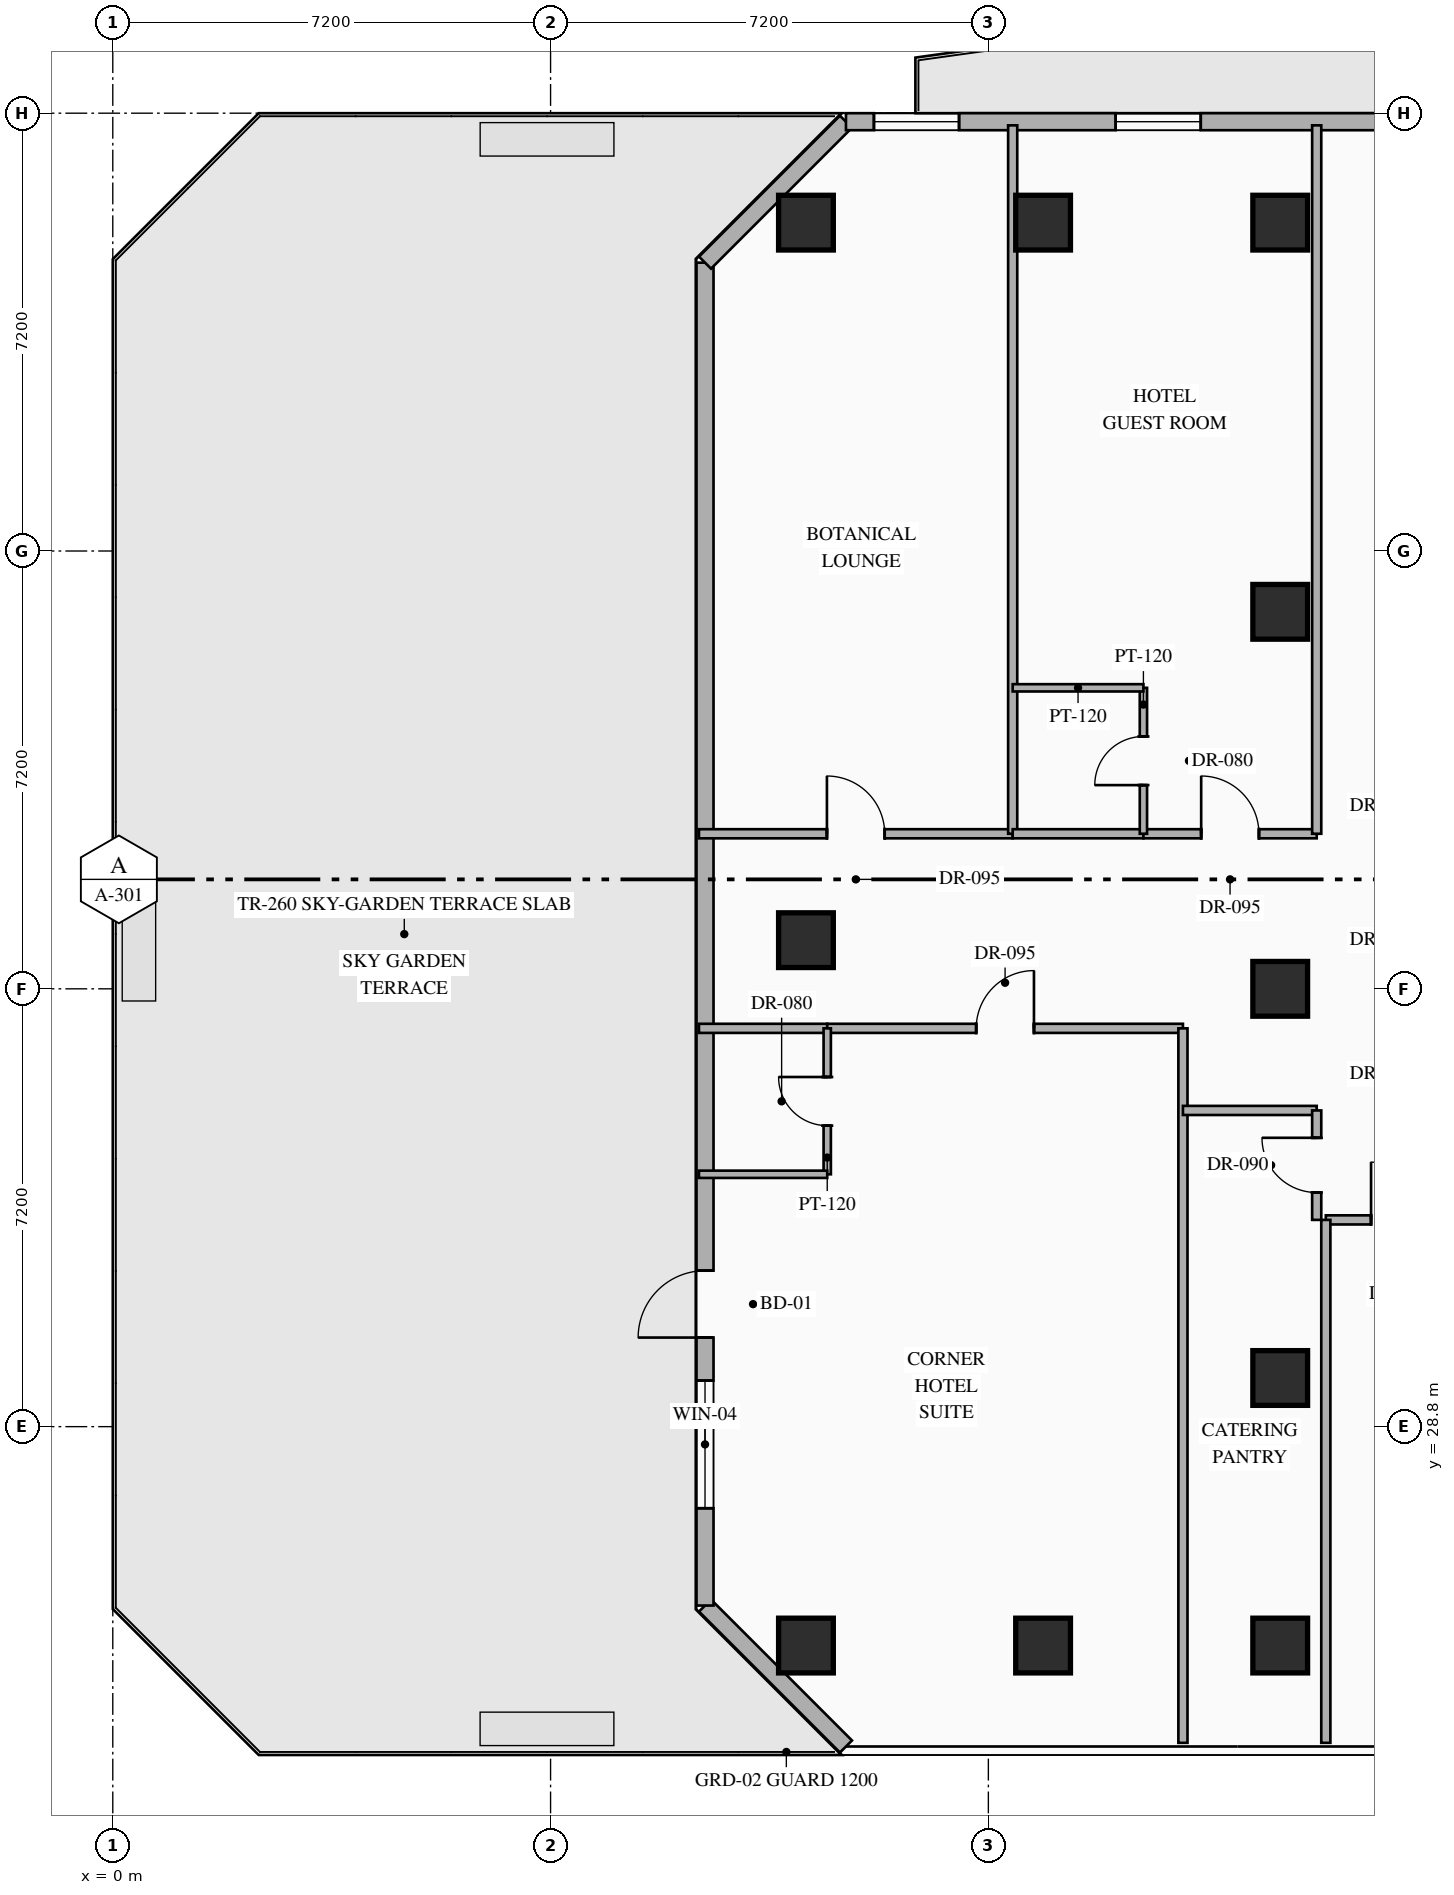
"""IFC4 building model, lengths in metres.
Left out: names, types, materials, properties, quantities, classifications, styles, units other than length and angle.
Written with IfcOpenShell. Run it as: python <this file> out.ifc"""

import sys

from ifc_helpers import new_model, si_unit, direction, frame, frame_2d, origin, origin_2d, place, context, subcontext, project, spatial, rectangle, hollow_rectangle, extrude, element, fill, save


model = new_model("IFC4")
c1 = context("Model", 3, precision=1e-05, world=origin(), true_north=direction((0.0, 1.0)))
c2 = subcontext(c1, "Body", "Model", "MODEL_VIEW")
j1 = project(units=[si_unit("LENGTHUNIT", "METRE"), si_unit("PLANEANGLEUNIT", "RADIAN")], contexts=[c1])
p1 = place(None, origin())
s1 = spatial("IfcSite", under=j1, at=p1, CompositionType="ELEMENT")
p2 = place(p1, origin())
s2 = spatial("IfcBuilding", under=s1, at=p2, CompositionType="ELEMENT")
p3 = place(p2, frame((0.0, 0.0, 70.1)))
s3 = spatial("IfcBuildingStorey", under=s2, at=p3, CompositionType="ELEMENT", Elevation=70.1)
for number, where, z_axis, x_axis in (
    (1, (11.4, 25.2, 0.0), (0.0, 0.0, 1.0), (1.0, 0.0, 0.0)),
    (2, (11.4, 48.6, 0.0), (0.0, 0.0, 1.0), (1.0, 0.0, 0.0)),
    (3, (19.2, 48.6, 0.0), (0.0, 0.0, 1.0), (1.0, 0.0, 0.0)),
    (4, (19.2, 25.2, 0.0), (0.0, 0.0, 1.0), (1.0, 0.0, 0.0)),
    (5, (19.2, 29.6, 0.0), (0.0, 0.0, 1.0), (1.0, 0.0, 0.0)),
    (6, (19.2, 42.2, 0.0), (0.0, 0.0, 1.0), (1.0, 0.0, 0.0)),
    (7, (11.4, 36.8, 0.0), (0.0, 0.0, 1.0), (1.0, 0.0, 0.0)),
    (8, (19.2, 36.0, 0.0), (0.0, 0.0, 1.0), (1.0, 0.0, 0.0)),
    (9, (15.3, 25.2, 0.0), (0.0, 0.0, 1.0), (1.0, 0.0, 0.0)),
    (10, (15.3, 48.6, 0.0), (0.0, 0.0, 1.0), (1.0, 0.0, 0.0)),
):
    element("IfcColumn", number, at=place(p3, frame(where, z_axis=z_axis, x_axis=x_axis)), inside=s3, PredefinedType="COLUMN", context=c2, shape_type="SweptSolid", body=[
        extrude(hollow_rectangle(XDim=0.9, YDim=0.9, WallThickness=0.036, at=origin_2d()), origin(), (0.0, 0.0, 1.0), 4.5),
    ])
p4 = place(p3, frame((12.058, 23.54, 0.0), z_axis=(0.0, 0.0, 1.0), x_axis=(-0.707144017911, 0.707069542501, 0.0)))
e11 = element("IfcWall", 11, at=p4, inside=s3, PredefinedType="STANDARD", context=c2, shape_type="SweptSolid", body=[
    extrude(rectangle(XDim=3.278, YDim=0.28, at=frame_2d((1.639, 0.0))), origin(), (0.0, 0.0, 1.0), 4.28),
])
p5 = place(p3, frame((9.74, 25.858, 0.0), z_axis=(0.0, 0.0, 1.0), x_axis=(0.0, 1.0, 0.0)))
e12 = element("IfcWall", 12, at=p5, inside=s3, PredefinedType="STANDARD", context=c2, shape_type="SweptSolid", body=[
    extrude(rectangle(XDim=22.084, YDim=0.28, at=frame_2d((11.042, 0.0))), origin(), (0.0, 0.0, 1.0), 4.28),
])
p6 = place(p5, frame((4.407, 0.0, 0.0)))
e13 = element("IfcOpeningElement", 13, at=p6, cuts=e12, PredefinedType="OPENING", context=c2, shape_type="SweptSolid", body=[
    extrude(rectangle(XDim=1.1, YDim=2.2, at=frame_2d((0.55, 1.1))), frame((0.0, 0.15, 0.0), z_axis=(0.0, -1.0, 0.0), x_axis=(1.0, 0.0, 0.0)), (0.0, 0.0, 1.0), 0.3),
])
p7 = place(p5, frame((1.6, 0.0, 0.75)))
e14 = element("IfcOpeningElement", 14, at=p7, cuts=e12, PredefinedType="OPENING", context=c2, shape_type="SweptSolid", body=[
    extrude(rectangle(XDim=2.1, YDim=2.2, at=frame_2d((1.05, 1.1))), frame((0.0, 0.15, 0.0), z_axis=(0.0, -1.0, 0.0), x_axis=(1.0, 0.0, 0.0)), (0.0, 0.0, 1.0), 0.3),
])
p8 = place(p3, frame((9.74, 47.942, 0.0), z_axis=(0.0, 0.0, 1.0), x_axis=(0.707106781187, 0.707106781187, 0.0)))
e15 = element("IfcWall", 15, at=p8, inside=s3, PredefinedType="STANDARD", context=c2, shape_type="SweptSolid", body=[
    extrude(rectangle(XDim=3.278, YDim=0.28, at=frame_2d((1.639, 0.0))), origin(), (0.0, 0.0, 1.0), 4.28),
])
p9 = place(p3, frame((12.058, 50.26, 0.0), z_axis=(0.0, 0.0, 1.0), x_axis=(1.0, 0.0, 0.0)))
e16 = element("IfcWall", 16, at=p9, inside=s3, PredefinedType="STANDARD", context=c2, shape_type="SweptSolid", body=[
    extrude(rectangle(XDim=30.484, YDim=0.28, at=frame_2d((15.242, 0.0))), origin(), (0.0, 0.0, 1.0), 4.28),
])
p10 = place(p9, frame((14.992, 0.0, 0.0)))
e17 = element("IfcOpeningElement", 17, at=p10, cuts=e16, PredefinedType="OPENING", context=c2, shape_type="SweptSolid", body=[
    extrude(rectangle(XDim=1.1, YDim=2.2, at=frame_2d((0.55, 1.1))), frame((0.0, 0.15, 0.0), z_axis=(0.0, -1.0, 0.0), x_axis=(1.0, 0.0, 0.0)), (0.0, 0.0, 1.0), 0.3),
])
p11 = place(p9, frame((0.46, 0.0, 0.85)))
e18 = element("IfcOpeningElement", 18, at=p11, cuts=e16, PredefinedType="OPENING", context=c2, shape_type="SweptSolid", body=[
    extrude(rectangle(XDim=1.4, YDim=1.8, at=frame_2d((0.7, 0.9))), frame((0.0, 0.15, 0.0), z_axis=(0.0, -1.0, 0.0), x_axis=(1.0, 0.0, 0.0)), (0.0, 0.0, 1.0), 0.3),
])
p12 = place(p9, frame((4.435, 0.0, 0.85)))
e19 = element("IfcOpeningElement", 19, at=p12, cuts=e16, PredefinedType="OPENING", context=c2, shape_type="SweptSolid", body=[
    extrude(rectangle(XDim=1.4, YDim=1.8, at=frame_2d((0.7, 0.9))), frame((0.0, 0.15, 0.0), z_axis=(0.0, -1.0, 0.0), x_axis=(1.0, 0.0, 0.0)), (0.0, 0.0, 1.0), 0.3),
])
p13 = place(p9, frame((11.361, 0.0, 0.85)))
e20 = element("IfcOpeningElement", 20, at=p13, cuts=e16, PredefinedType="OPENING", context=c2, shape_type="SweptSolid", body=[
    extrude(rectangle(XDim=1.4, YDim=1.8, at=frame_2d((0.7, 0.9))), frame((0.0, 0.15, 0.0), z_axis=(0.0, -1.0, 0.0), x_axis=(1.0, 0.0, 0.0)), (0.0, 0.0, 1.0), 0.3),
])
p14 = place(p9, frame((19.693, 0.0, 0.85)))
e21 = element("IfcOpeningElement", 21, at=p14, cuts=e16, PredefinedType="OPENING", context=c2, shape_type="SweptSolid", body=[
    extrude(rectangle(XDim=1.4, YDim=1.8, at=frame_2d((0.7, 0.9))), frame((0.0, 0.15, 0.0), z_axis=(0.0, -1.0, 0.0), x_axis=(1.0, 0.0, 0.0)), (0.0, 0.0, 1.0), 0.3),
])
p15 = place(p9, frame((23.252, 0.0, 0.85)))
e22 = element("IfcOpeningElement", 22, at=p15, cuts=e16, PredefinedType="OPENING", context=c2, shape_type="SweptSolid", body=[
    extrude(rectangle(XDim=1.4, YDim=1.8, at=frame_2d((0.7, 0.9))), frame((0.0, 0.15, 0.0), z_axis=(0.0, -1.0, 0.0), x_axis=(1.0, 0.0, 0.0)), (0.0, 0.0, 1.0), 0.3),
])
p16 = place(p9, frame((27.417, 0.0, 0.85)))
e23 = element("IfcOpeningElement", 23, at=p16, cuts=e16, PredefinedType="OPENING", context=c2, shape_type="SweptSolid", body=[
    extrude(rectangle(XDim=1.4, YDim=1.8, at=frame_2d((0.7, 0.9))), frame((0.0, 0.15, 0.0), z_axis=(0.0, -1.0, 0.0), x_axis=(1.0, 0.0, 0.0)), (0.0, 0.0, 1.0), 0.3),
])
p17 = place(p3, frame((19.95, 32.2, 0.0), z_axis=(0.0, 0.0, 1.0), x_axis=(1.0, 0.0, 0.0)))
e24 = element("IfcWall", 24, at=p17, inside=s3, PredefinedType="PARTITIONING", context=c2, shape_type="SweptSolid", body=[
    extrude(rectangle(XDim=5.35, YDim=0.15, at=frame_2d((2.675, 0.0))), origin(), (0.0, 0.0, 1.0), 4.28),
])
p18 = place(p17, frame((0.744, 0.0, 0.0)))
e25 = element("IfcOpeningElement", 25, at=p18, cuts=e24, PredefinedType="OPENING", context=c2, shape_type="SweptSolid", body=[
    extrude(rectangle(XDim=0.95, YDim=2.15, at=frame_2d((0.475, 1.075))), frame((0.0, 0.085, 0.0), z_axis=(0.0, -1.0, 0.0), x_axis=(1.0, 0.0, 0.0)), (0.0, 0.0, 1.0), 0.17),
])
p19 = place(p3, frame((19.95, 23.6, 0.0), z_axis=(0.0, 0.0, 1.0), x_axis=(0.0, 1.0, 0.0)))
e26 = element("IfcWall", 26, at=p19, inside=s3, PredefinedType="PARTITIONING", context=c2, shape_type="SweptSolid", body=[
    extrude(rectangle(XDim=8.6, YDim=0.15, at=frame_2d((4.3, 0.0))), origin(), (0.0, 0.0, 1.0), 4.28),
])
p20 = place(p3, frame((9.64, 38.55, 0.0), z_axis=(0.0, 0.0, 1.0), x_axis=(1.0, 0.0, 0.0)))
e27 = element("IfcWall", 27, at=p20, inside=s3, PredefinedType="PARTITIONING", context=c2, shape_type="SweptSolid", body=[
    extrude(rectangle(XDim=5.16, YDim=0.15, at=frame_2d((2.58, 0.0))), origin(), (0.0, 0.0, 1.0), 3.925),
])
p21 = place(p20, frame((2.105, 0.0, 0.0)))
e28 = element("IfcOpeningElement", 28, at=p21, cuts=e27, PredefinedType="OPENING", context=c2, shape_type="SweptSolid", body=[
    extrude(rectangle(XDim=0.95, YDim=2.15, at=frame_2d((0.475, 1.075))), frame((0.0, 0.085, 0.0), z_axis=(0.0, -1.0, 0.0), x_axis=(1.0, 0.0, 0.0)), (0.0, 0.0, 1.0), 0.17),
])
p22 = place(p3, frame((14.8, 38.55, 0.0), z_axis=(0.0, 0.0, 1.0), x_axis=(0.0, 1.0, 0.0)))
e29 = element("IfcWall", 29, at=p22, inside=s3, PredefinedType="PARTITIONING", context=c2, shape_type="SweptSolid", body=[
    extrude(rectangle(XDim=11.65, YDim=0.15, at=frame_2d((5.825, 0.0))), origin(), (0.0, 0.0, 1.0), 4.28),
])
p23 = place(p3, frame((14.8, 38.55, 0.0), z_axis=(0.0, 0.0, 1.0), x_axis=(1.0, 0.0, 0.0)))
e30 = element("IfcWall", 30, at=p23, inside=s3, PredefinedType="PARTITIONING", context=c2, shape_type="SweptSolid", body=[
    extrude(rectangle(XDim=2.15, YDim=0.15, at=frame_2d((1.075, 0.0))), origin(), (0.0, 0.0, 1.0), 3.925),
])
p24 = place(p3, frame((16.95, 38.55, 0.0), z_axis=(0.0, 0.0, 1.0), x_axis=(1.0, 0.0, 0.0)))
e31 = element("IfcWall", 31, at=p24, inside=s3, PredefinedType="PARTITIONING", context=c2, shape_type="SweptSolid", body=[
    extrude(rectangle(XDim=2.85, YDim=0.15, at=frame_2d((1.425, 0.0))), origin(), (0.0, 0.0, 1.0), 3.925),
])
p25 = place(p24, frame((0.95, 0.0, 0.0)))
e32 = element("IfcOpeningElement", 32, at=p25, cuts=e31, PredefinedType="OPENING", context=c2, shape_type="SweptSolid", body=[
    extrude(rectangle(XDim=0.95, YDim=2.15, at=frame_2d((0.475, 1.075))), frame((0.0, 0.085, 0.0), z_axis=(0.0, -1.0, 0.0), x_axis=(1.0, 0.0, 0.0)), (0.0, 0.0, 1.0), 0.17),
])
p26 = place(p3, frame((16.95, 38.55, 0.0), z_axis=(0.0, 0.0, 1.0), x_axis=(0.0, 1.0, 0.0)))
e33 = element("IfcWall", 33, at=p26, inside=s3, PredefinedType="PARTITIONING", context=c2, shape_type="SweptSolid", body=[
    extrude(rectangle(XDim=2.4, YDim=0.12, at=frame_2d((1.2, 0.0))), origin(), (0.0, 0.0, 1.0), 4.28),
])
p27 = place(p26, frame((0.8, 0.0, 0.0)))
e34 = element("IfcOpeningElement", 34, at=p27, cuts=e33, PredefinedType="OPENING", context=c2, shape_type="SweptSolid", body=[
    extrude(rectangle(XDim=0.8, YDim=2.06, at=frame_2d((0.4, 1.03))), frame((0.0, 0.07, 0.0), z_axis=(0.0, -1.0, 0.0), x_axis=(1.0, 0.0, 0.0)), (0.0, 0.0, 1.0), 0.14),
])
p28 = place(p3, frame((14.8, 40.95, 0.0), z_axis=(0.0, 0.0, 1.0), x_axis=(1.0, 0.0, 0.0)))
e35 = element("IfcWall", 35, at=p28, inside=s3, PredefinedType="PARTITIONING", context=c2, shape_type="SweptSolid", body=[
    extrude(rectangle(XDim=2.15, YDim=0.12, at=frame_2d((1.075, 0.0))), origin(), (0.0, 0.0, 1.0), 3.925),
])
p29 = place(p3, frame((19.8, 38.55, 0.0), z_axis=(0.0, 0.0, 1.0), x_axis=(0.0, 1.0, 0.0)))
e36 = element("IfcWall", 36, at=p29, inside=s3, PredefinedType="PARTITIONING", context=c2, shape_type="SweptSolid", body=[
    extrude(rectangle(XDim=11.65, YDim=0.15, at=frame_2d((5.825, 0.0))), origin(), (0.0, 0.0, 1.0), 4.28),
])
p30 = place(p3, frame((9.64, 35.35, 0.0), z_axis=(0.0, 0.0, 1.0), x_axis=(1.0, 0.0, 0.0)))
e37 = element("IfcWall", 37, at=p30, inside=s3, PredefinedType="PARTITIONING", context=c2, shape_type="SweptSolid", body=[
    extrude(rectangle(XDim=2.11, YDim=0.15, at=frame_2d((1.055, 0.0))), origin(), (0.0, 0.0, 1.0), 4.28),
])
p31 = place(p3, frame((11.75, 35.35, 0.0), z_axis=(0.0, 0.0, 1.0), x_axis=(1.0, 0.0, 0.0)))
e38 = element("IfcWall", 38, at=p31, inside=s3, PredefinedType="PARTITIONING", context=c2, shape_type="SweptSolid", body=[
    extrude(rectangle(XDim=5.85, YDim=0.15, at=frame_2d((2.925, 0.0))), origin(), (0.0, 0.0, 1.0), 4.28),
])
p32 = place(p31, frame((2.45, 0.0, 0.0)))
e39 = element("IfcOpeningElement", 39, at=p32, cuts=e38, PredefinedType="OPENING", context=c2, shape_type="SweptSolid", body=[
    extrude(rectangle(XDim=0.95, YDim=2.15, at=frame_2d((0.475, 1.075))), frame((0.0, 0.085, 0.0), z_axis=(0.0, -1.0, 0.0), x_axis=(1.0, 0.0, 0.0)), (0.0, 0.0, 1.0), 0.17),
])
p33 = place(p3, frame((11.75, 32.95, 0.0), z_axis=(0.0, 0.0, 1.0), x_axis=(0.0, 1.0, 0.0)))
e40 = element("IfcWall", 40, at=p33, inside=s3, PredefinedType="PARTITIONING", context=c2, shape_type="SweptSolid", body=[
    extrude(rectangle(XDim=2.4, YDim=0.12, at=frame_2d((1.2, 0.0))), origin(), (0.0, 0.0, 1.0), 4.28),
])
p34 = place(p33, frame((0.8, 0.0, 0.0)))
e41 = element("IfcOpeningElement", 41, at=p34, cuts=e40, PredefinedType="OPENING", context=c2, shape_type="SweptSolid", body=[
    extrude(rectangle(XDim=0.8, YDim=2.06, at=frame_2d((0.4, 1.03))), frame((0.0, 0.07, 0.0), z_axis=(0.0, -1.0, 0.0), x_axis=(1.0, 0.0, 0.0)), (0.0, 0.0, 1.0), 0.14),
])
p35 = place(p3, frame((9.64, 32.95, 0.0), z_axis=(0.0, 0.0, 1.0), x_axis=(1.0, 0.0, 0.0)))
e42 = element("IfcWall", 42, at=p35, inside=s3, PredefinedType="PARTITIONING", context=c2, shape_type="SweptSolid", body=[
    extrude(rectangle(XDim=2.11, YDim=0.12, at=frame_2d((1.055, 0.0))), origin(), (0.0, 0.0, 1.0), 4.28),
])
p36 = place(p3, frame((17.6, 23.6, 0.0), z_axis=(0.0, 0.0, 1.0), x_axis=(0.0, 1.0, 0.0)))
e43 = element("IfcWall", 43, at=p36, inside=s3, PredefinedType="PARTITIONING", context=c2, shape_type="SweptSolid", body=[
    extrude(rectangle(XDim=11.75, YDim=0.15, at=frame_2d((5.875, 0.0))), origin(), (0.0, 0.0, 1.0), 4.28),
])
p37 = place(p3, frame((17.6, 34.0, 0.0), z_axis=(0.0, 0.0, 1.0), x_axis=(1.0, 0.0, 0.0)))
e44 = element("IfcWall", 44, at=p37, inside=s3, PredefinedType="PARTITIONING", context=c2, shape_type="SweptSolid", body=[
    extrude(rectangle(XDim=2.2, YDim=0.15, at=frame_2d((1.1, 0.0))), origin(), (0.0, 0.0, 1.0), 4.28),
])
p38 = place(p3, frame((19.8, 32.2, 0.0), z_axis=(0.0, 0.0, 1.0), x_axis=(0.0, 1.0, 0.0)))
e45 = element("IfcWall", 45, at=p38, inside=s3, PredefinedType="PARTITIONING", context=c2, shape_type="SweptSolid", body=[
    extrude(rectangle(XDim=1.8, YDim=0.15, at=frame_2d((0.9, 0.0))), origin(), (0.0, 0.0, 1.0), 4.28),
])
p39 = place(p38, frame((0.45, 0.0, 0.0)))
e46 = element("IfcOpeningElement", 46, at=p39, cuts=e45, PredefinedType="OPENING", context=c2, shape_type="SweptSolid", body=[
    extrude(rectangle(XDim=0.9, YDim=2.15, at=frame_2d((0.45, 1.075))), frame((0.0, 0.085, 0.0), z_axis=(0.0, -1.0, 0.0), x_axis=(1.0, 0.0, 0.0)), (0.0, 0.0, 1.0), 0.17),
])
p40 = place(p6, origin())
e47 = element("IfcDoor", 47, at=p40, inside=s3, OperationType="SINGLE_SWING_LEFT", PredefinedType="DOOR", context=c2, shape_type="SweptSolid", body=[
    extrude(rectangle(XDim=1.1, YDim=2.2, at=frame_2d((0.55, 1.1))), frame((0.0, 0.025, 0.0), z_axis=(0.0, -1.0, 0.0), x_axis=(1.0, 0.0, 0.0)), (0.0, 0.0, 1.0), 0.05),
])
fill(e13, e47)
p41 = place(p7, origin())
e48 = element("IfcWindow", 48, at=p41, inside=s3, PartitioningType="SINGLE_PANEL", PredefinedType="WINDOW", context=c2, shape_type="SweptSolid", body=[
    extrude(rectangle(XDim=2.1, YDim=2.2, at=frame_2d((1.05, 1.1))), frame((0.0, 0.03, 0.0), z_axis=(0.0, -1.0, 0.0), x_axis=(1.0, 0.0, 0.0)), (0.0, 0.0, 1.0), 0.06),
])
fill(e14, e48)
p42 = place(p11, origin())
e49 = element("IfcWindow", 49, at=p42, inside=s3, PartitioningType="SINGLE_PANEL", PredefinedType="WINDOW", context=c2, shape_type="SweptSolid", body=[
    extrude(rectangle(XDim=1.4, YDim=1.8, at=frame_2d((0.7, 0.9))), frame((0.0, 0.03, 0.0), z_axis=(0.0, -1.0, 0.0), x_axis=(1.0, 0.0, 0.0)), (0.0, 0.0, 1.0), 0.06),
])
fill(e18, e49)
p43 = place(p12, origin())
e50 = element("IfcWindow", 50, at=p43, inside=s3, PartitioningType="SINGLE_PANEL", PredefinedType="WINDOW", context=c2, shape_type="SweptSolid", body=[
    extrude(rectangle(XDim=1.4, YDim=1.8, at=frame_2d((0.7, 0.9))), frame((0.0, 0.03, 0.0), z_axis=(0.0, -1.0, 0.0), x_axis=(1.0, 0.0, 0.0)), (0.0, 0.0, 1.0), 0.06),
])
fill(e19, e50)
p44 = place(p18, origin())
e51 = element("IfcDoor", 51, at=p44, inside=s3, OperationType="SINGLE_SWING_LEFT", PredefinedType="DOOR", context=c2, shape_type="SweptSolid", body=[
    extrude(rectangle(XDim=0.95, YDim=2.15, at=frame_2d((0.475, 1.075))), frame((0.0, 0.025, 0.0), z_axis=(0.0, -1.0, 0.0), x_axis=(1.0, 0.0, 0.0)), (0.0, 0.0, 1.0), 0.05),
])
fill(e25, e51)
p45 = place(p21, origin())
e52 = element("IfcDoor", 52, at=p45, inside=s3, OperationType="SINGLE_SWING_LEFT", PredefinedType="DOOR", context=c2, shape_type="SweptSolid", body=[
    extrude(rectangle(XDim=0.95, YDim=2.15, at=frame_2d((0.475, 1.075))), frame((0.0, 0.025, 0.0), z_axis=(0.0, -1.0, 0.0), x_axis=(1.0, 0.0, 0.0)), (0.0, 0.0, 1.0), 0.05),
])
fill(e28, e52)
p46 = place(p25, origin())
e53 = element("IfcDoor", 53, at=p46, inside=s3, OperationType="SINGLE_SWING_LEFT", PredefinedType="DOOR", context=c2, shape_type="SweptSolid", body=[
    extrude(rectangle(XDim=0.95, YDim=2.15, at=frame_2d((0.475, 1.075))), frame((0.0, 0.025, 0.0), z_axis=(0.0, -1.0, 0.0), x_axis=(1.0, 0.0, 0.0)), (0.0, 0.0, 1.0), 0.05),
])
fill(e32, e53)
p47 = place(p27, origin())
e54 = element("IfcDoor", 54, at=p47, inside=s3, OperationType="SINGLE_SWING_LEFT", PredefinedType="DOOR", context=c2, shape_type="SweptSolid", body=[
    extrude(rectangle(XDim=0.8, YDim=2.06, at=frame_2d((0.4, 1.03))), frame((0.0, 0.025, 0.0), z_axis=(0.0, -1.0, 0.0), x_axis=(1.0, 0.0, 0.0)), (0.0, 0.0, 1.0), 0.05),
])
fill(e34, e54)
p48 = place(p32, origin())
e55 = element("IfcDoor", 55, at=p48, inside=s3, OperationType="SINGLE_SWING_RIGHT", PredefinedType="DOOR", context=c2, shape_type="SweptSolid", body=[
    extrude(rectangle(XDim=0.95, YDim=2.15, at=frame_2d((0.475, 1.075))), frame((0.0, 0.025, 0.0), z_axis=(0.0, -1.0, 0.0), x_axis=(1.0, 0.0, 0.0)), (0.0, 0.0, 1.0), 0.05),
])
fill(e39, e55)
p49 = place(p34, origin())
e56 = element("IfcDoor", 56, at=p49, inside=s3, OperationType="SINGLE_SWING_RIGHT", PredefinedType="DOOR", context=c2, shape_type="SweptSolid", body=[
    extrude(rectangle(XDim=0.8, YDim=2.06, at=frame_2d((0.4, 1.03))), frame((0.0, 0.025, 0.0), z_axis=(0.0, -1.0, 0.0), x_axis=(1.0, 0.0, 0.0)), (0.0, 0.0, 1.0), 0.05),
])
fill(e41, e56)
p50 = place(p39, origin())
e57 = element("IfcDoor", 57, at=p50, inside=s3, OperationType="SINGLE_SWING_RIGHT", PredefinedType="DOOR", context=c2, shape_type="SweptSolid", body=[
    extrude(rectangle(XDim=0.9, YDim=2.15, at=frame_2d((0.45, 1.075))), frame((0.0, 0.025, 0.0), z_axis=(0.0, -1.0, 0.0), x_axis=(1.0, 0.0, 0.0)), (0.0, 0.0, 1.0), 0.05),
])
fill(e46, e57)
save(model, sys.argv[1])
